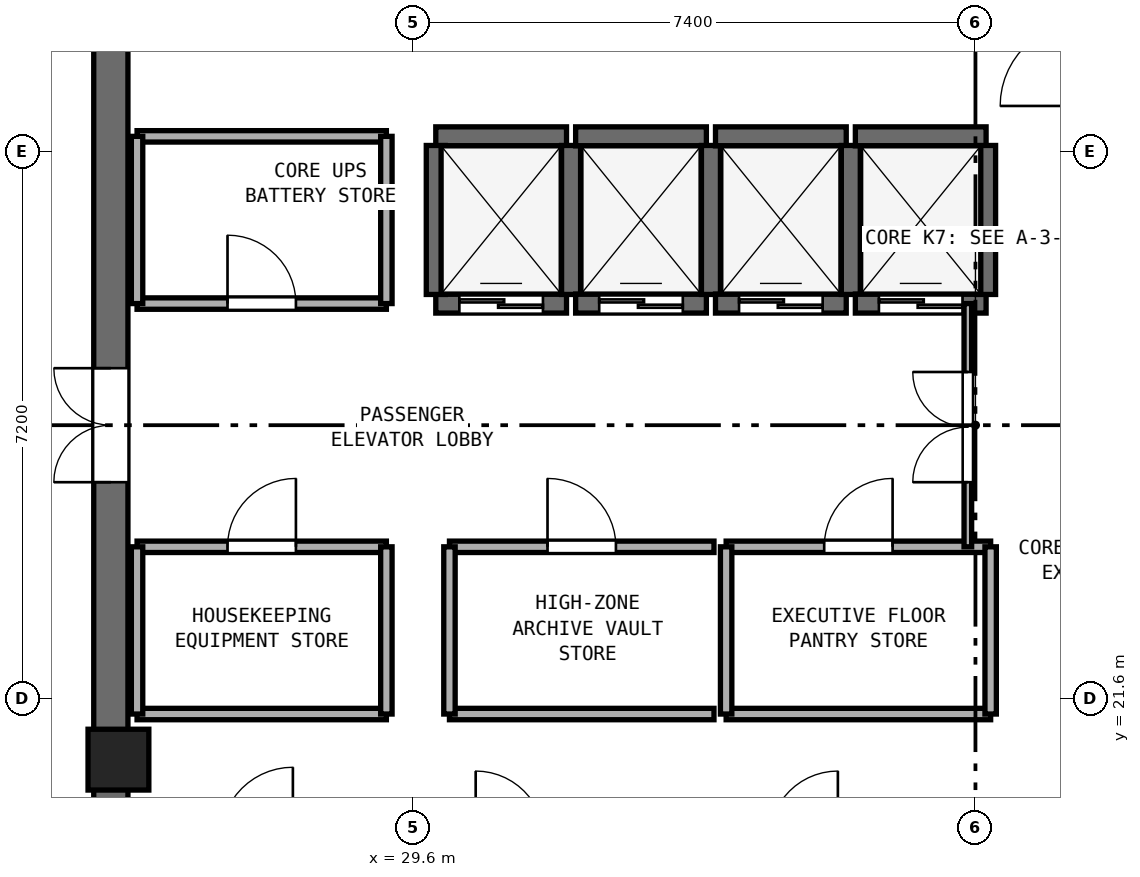
"""IFC4 building model, lengths in metres.
Left out: names, types, materials, properties, quantities, classifications, styles, units other than length and angle.
Written with IfcOpenShell. Run it as: python <this file> out.ifc"""

import sys

from ifc_helpers import new_model, si_unit, direction, frame, frame_2d, origin, origin_2d, place, context, subcontext, project, spatial, rectangle, extrude, element, fill, save


model = new_model("IFC4")
c1 = context("Model", 3, precision=1e-05, world=origin(), true_north=direction((0.0, 1.0)))
c2 = subcontext(c1, "Body", "Model", "MODEL_VIEW")
j1 = project(units=[si_unit("LENGTHUNIT", "METRE"), si_unit("PLANEANGLEUNIT", "RADIAN")], contexts=[c1])
p1 = place(None, origin())
s1 = spatial("IfcSite", under=j1, at=p1, CompositionType="ELEMENT")
p2 = place(p1, origin())
s2 = spatial("IfcBuilding", under=s1, at=p2, CompositionType="ELEMENT")
p3 = place(p2, frame((0.0, 0.0, 240.2)))
s3 = spatial("IfcBuildingStorey", under=s2, at=p3, CompositionType="ELEMENT", Elevation=240.2)
p4 = place(p3, frame((25.625, 17.45, 0.0), z_axis=(0.0, 0.0, 1.0), x_axis=(0.0, 1.0, 0.0)))
e1 = element("IfcWall", 1, at=p4, inside=s3, PredefinedType="SHEAR", context=c2, shape_type="SweptSolid", body=[
    extrude(rectangle(XDim=15.5, YDim=0.45, at=frame_2d((7.75, 0.0))), origin(), (0.0, 0.0, 1.0), 3.51),
])
p5 = place(p4, frame((7.0, 0.0, 0.0)))
e2 = element("IfcOpeningElement", 2, at=p5, cuts=e1, PredefinedType="OPENING", context=c2, shape_type="SweptSolid", body=[
    extrude(rectangle(XDim=1.5, YDim=2.15, at=frame_2d((0.75, 1.075))), frame((0.0, 0.235, 0.0), z_axis=(0.0, -1.0, 0.0), x_axis=(1.0, 0.0, 0.0)), (0.0, 0.0, 1.0), 0.47),
])
p6 = place(p3, frame((25.725, 20.8, 0.0), z_axis=(0.0, 0.0, 1.0), x_axis=(1.0, 0.0, 0.0)))
e3 = element("IfcColumn", 3, at=p6, inside=s3, PredefinedType="PILASTER", context=c2, shape_type="SweptSolid", body=[
    extrude(rectangle(XDim=0.8, YDim=0.8, at=origin_2d()), origin(), (0.0, 0.0, 1.0), 3.8),
])
p7 = place(p3, frame((29.9, 26.8, 0.0), z_axis=(0.0, 0.0, 1.0), x_axis=(1.0, 0.0, 0.0)))
e4 = element("IfcWall", 4, at=p7, inside=s3, PredefinedType="SHEAR", context=c2, shape_type="SweptSolid", body=[
    extrude(rectangle(XDim=1.72, YDim=0.25, at=frame_2d((0.86, 0.0))), origin(), (0.0, 0.0, 1.0), 3.51),
])
p8 = place(p7, frame((0.31, 0.0, 0.0)))
e5 = element("IfcOpeningElement", 5, at=p8, cuts=e4, PredefinedType="OPENING", context=c2, shape_type="SweptSolid", body=[
    extrude(rectangle(XDim=1.1, YDim=2.15, at=frame_2d((0.55, 1.075))), frame((0.0, 0.135, 0.0), z_axis=(0.0, -1.0, 0.0), x_axis=(1.0, 0.0, 0.0)), (0.0, 0.0, 1.0), 0.27),
])
p9 = place(p3, frame((29.9, 29.0, 0.0), z_axis=(0.0, 0.0, 1.0), x_axis=(1.0, 0.0, 0.0)))
e6 = element("IfcWall", 6, at=p9, inside=s3, PredefinedType="SHEAR", context=c2, shape_type="SweptSolid", body=[
    extrude(rectangle(XDim=1.72, YDim=0.25, at=frame_2d((0.86, 0.0))), origin(), (0.0, 0.0, 1.0), 3.51),
])
for number, where, z_axis, x_axis in (
    (7, (29.9, 26.92, 0.0), (0.0, 0.0, 1.0), (0.0, 1.0, 0.0)),
    (8, (31.68, 26.92, 0.0), (0.0, 0.0, 1.0), (0.0, 1.0, 0.0)),
):
    element("IfcWall", number, at=place(p3, frame(where, z_axis=z_axis, x_axis=x_axis)), inside=s3, PredefinedType="SHEAR", context=c2, shape_type="SweptSolid", body=[
        extrude(rectangle(XDim=1.96, YDim=0.25, at=frame_2d((0.98, 0.0))), origin(), (0.0, 0.0, 1.0), 3.51),
    ])
p10 = place(p3, frame((31.74, 26.8, 0.0), z_axis=(0.0, 0.0, 1.0), x_axis=(1.0, 0.0, 0.0)))
e9 = element("IfcWall", 9, at=p10, inside=s3, PredefinedType="SHEAR", context=c2, shape_type="SweptSolid", body=[
    extrude(rectangle(XDim=1.72, YDim=0.25, at=frame_2d((0.86, 0.0))), origin(), (0.0, 0.0, 1.0), 3.51),
])
p11 = place(p10, frame((0.31, 0.0, 0.0)))
e10 = element("IfcOpeningElement", 10, at=p11, cuts=e9, PredefinedType="OPENING", context=c2, shape_type="SweptSolid", body=[
    extrude(rectangle(XDim=1.1, YDim=2.15, at=frame_2d((0.55, 1.075))), frame((0.0, 0.135, 0.0), z_axis=(0.0, -1.0, 0.0), x_axis=(1.0, 0.0, 0.0)), (0.0, 0.0, 1.0), 0.27),
])
p12 = place(p3, frame((31.74, 29.0, 0.0), z_axis=(0.0, 0.0, 1.0), x_axis=(1.0, 0.0, 0.0)))
e11 = element("IfcWall", 11, at=p12, inside=s3, PredefinedType="SHEAR", context=c2, shape_type="SweptSolid", body=[
    extrude(rectangle(XDim=1.72, YDim=0.25, at=frame_2d((0.86, 0.0))), origin(), (0.0, 0.0, 1.0), 3.51),
])
p13 = place(p3, frame((33.52, 26.92, 0.0), z_axis=(0.0, 0.0, 1.0), x_axis=(0.0, 1.0, 0.0)))
e12 = element("IfcWall", 12, at=p13, inside=s3, PredefinedType="SHEAR", context=c2, shape_type="SweptSolid", body=[
    extrude(rectangle(XDim=1.96, YDim=0.25, at=frame_2d((0.98, 0.0))), origin(), (0.0, 0.0, 1.0), 3.51),
])
p14 = place(p3, frame((33.58, 26.8, 0.0), z_axis=(0.0, 0.0, 1.0), x_axis=(1.0, 0.0, 0.0)))
e13 = element("IfcWall", 13, at=p14, inside=s3, PredefinedType="SHEAR", context=c2, shape_type="SweptSolid", body=[
    extrude(rectangle(XDim=1.72, YDim=0.25, at=frame_2d((0.86, 0.0))), origin(), (0.0, 0.0, 1.0), 3.51),
])
p15 = place(p14, frame((0.31, 0.0, 0.0)))
e14 = element("IfcOpeningElement", 14, at=p15, cuts=e13, PredefinedType="OPENING", context=c2, shape_type="SweptSolid", body=[
    extrude(rectangle(XDim=1.1, YDim=2.15, at=frame_2d((0.55, 1.075))), frame((0.0, 0.135, 0.0), z_axis=(0.0, -1.0, 0.0), x_axis=(1.0, 0.0, 0.0)), (0.0, 0.0, 1.0), 0.27),
])
p16 = place(p3, frame((33.58, 29.0, 0.0), z_axis=(0.0, 0.0, 1.0), x_axis=(1.0, 0.0, 0.0)))
e15 = element("IfcWall", 15, at=p16, inside=s3, PredefinedType="SHEAR", context=c2, shape_type="SweptSolid", body=[
    extrude(rectangle(XDim=1.72, YDim=0.25, at=frame_2d((0.86, 0.0))), origin(), (0.0, 0.0, 1.0), 3.51),
])
p17 = place(p3, frame((35.36, 26.92, 0.0), z_axis=(0.0, 0.0, 1.0), x_axis=(0.0, 1.0, 0.0)))
e16 = element("IfcWall", 16, at=p17, inside=s3, PredefinedType="SHEAR", context=c2, shape_type="SweptSolid", body=[
    extrude(rectangle(XDim=1.96, YDim=0.25, at=frame_2d((0.98, 0.0))), origin(), (0.0, 0.0, 1.0), 3.51),
])
p18 = place(p3, frame((35.42, 26.8, 0.0), z_axis=(0.0, 0.0, 1.0), x_axis=(1.0, 0.0, 0.0)))
e17 = element("IfcWall", 17, at=p18, inside=s3, PredefinedType="SHEAR", context=c2, shape_type="SweptSolid", body=[
    extrude(rectangle(XDim=1.72, YDim=0.25, at=frame_2d((0.86, 0.0))), origin(), (0.0, 0.0, 1.0), 3.51),
])
p19 = place(p18, frame((0.31, 0.0, 0.0)))
e18 = element("IfcOpeningElement", 18, at=p19, cuts=e17, PredefinedType="OPENING", context=c2, shape_type="SweptSolid", body=[
    extrude(rectangle(XDim=1.1, YDim=2.15, at=frame_2d((0.55, 1.075))), frame((0.0, 0.135, 0.0), z_axis=(0.0, -1.0, 0.0), x_axis=(1.0, 0.0, 0.0)), (0.0, 0.0, 1.0), 0.27),
])
p20 = place(p3, frame((35.42, 29.0, 0.0), z_axis=(0.0, 0.0, 1.0), x_axis=(1.0, 0.0, 0.0)))
e19 = element("IfcWall", 19, at=p20, inside=s3, PredefinedType="SHEAR", context=c2, shape_type="SweptSolid", body=[
    extrude(rectangle(XDim=1.72, YDim=0.25, at=frame_2d((0.86, 0.0))), origin(), (0.0, 0.0, 1.0), 3.51),
])
p21 = place(p3, frame((37.14, 26.92, 0.0), z_axis=(0.0, 0.0, 1.0), x_axis=(0.0, 1.0, 0.0)))
e20 = element("IfcWall", 20, at=p21, inside=s3, PredefinedType="SHEAR", context=c2, shape_type="SweptSolid", body=[
    extrude(rectangle(XDim=1.96, YDim=0.25, at=frame_2d((0.98, 0.0))), origin(), (0.0, 0.0, 1.0), 3.51),
])
p22 = place(p3, frame((25.97, 26.8, 0.0), z_axis=(0.0, 0.0, 1.0), x_axis=(1.0, 0.0, 0.0)))
e21 = element("IfcWall", 21, at=p22, inside=s3, PredefinedType="PARTITIONING", context=c2, shape_type="SweptSolid", body=[
    extrude(rectangle(XDim=3.28, YDim=0.15, at=frame_2d((1.64, 0.0))), origin(), (0.0, 0.0, 1.0), 3.51),
])
p23 = place(p22, frame((1.19, 0.0, 0.0)))
e22 = element("IfcOpeningElement", 22, at=p23, cuts=e21, PredefinedType="OPENING", context=c2, shape_type="SweptSolid", body=[
    extrude(rectangle(XDim=0.9, YDim=2.1, at=frame_2d((0.45, 1.05))), frame((0.0, 0.085, 0.0), z_axis=(0.0, -1.0, 0.0), x_axis=(1.0, 0.0, 0.0)), (0.0, 0.0, 1.0), 0.17),
])
p24 = place(p3, frame((25.97, 29.0, 0.0), z_axis=(0.0, 0.0, 1.0), x_axis=(1.0, 0.0, 0.0)))
e23 = element("IfcWall", 23, at=p24, inside=s3, PredefinedType="PARTITIONING", context=c2, shape_type="SweptSolid", body=[
    extrude(rectangle(XDim=3.28, YDim=0.15, at=frame_2d((1.64, 0.0))), origin(), (0.0, 0.0, 1.0), 3.51),
])
p25 = place(p3, frame((25.97, 26.8, 0.0), z_axis=(0.0, 0.0, 1.0), x_axis=(0.0, 1.0, 0.0)))
e24 = element("IfcWall", 24, at=p25, inside=s3, PredefinedType="PARTITIONING", context=c2, shape_type="SweptSolid", body=[
    extrude(rectangle(XDim=2.2, YDim=0.15, at=frame_2d((1.1, 0.0))), origin(), (0.0, 0.0, 1.0), 2.61),
])
p26 = place(p3, frame((29.25, 26.8, 0.0), z_axis=(0.0, 0.0, 1.0), x_axis=(0.0, 1.0, 0.0)))
e25 = element("IfcWall", 25, at=p26, inside=s3, PredefinedType="PARTITIONING", context=c2, shape_type="SweptSolid", body=[
    extrude(rectangle(XDim=2.2, YDim=0.15, at=frame_2d((1.1, 0.0))), origin(), (0.0, 0.0, 1.0), 3.51),
])
p27 = place(p3, frame((25.97, 21.4, 0.0), z_axis=(0.0, 0.0, 1.0), x_axis=(1.0, 0.0, 0.0)))
e26 = element("IfcWall", 26, at=p27, inside=s3, PredefinedType="PARTITIONING", context=c2, shape_type="SweptSolid", body=[
    extrude(rectangle(XDim=3.28, YDim=0.15, at=frame_2d((1.64, 0.0))), origin(), (0.0, 0.0, 1.0), 3.51),
])
p28 = place(p3, frame((25.97, 23.6, 0.0), z_axis=(0.0, 0.0, 1.0), x_axis=(1.0, 0.0, 0.0)))
e27 = element("IfcWall", 27, at=p28, inside=s3, PredefinedType="PARTITIONING", context=c2, shape_type="SweptSolid", body=[
    extrude(rectangle(XDim=3.28, YDim=0.15, at=frame_2d((1.64, 0.0))), origin(), (0.0, 0.0, 1.0), 3.51),
])
p29 = place(p28, frame((1.19, 0.0, 0.0)))
e28 = element("IfcOpeningElement", 28, at=p29, cuts=e27, PredefinedType="OPENING", context=c2, shape_type="SweptSolid", body=[
    extrude(rectangle(XDim=0.9, YDim=2.1, at=frame_2d((0.45, 1.05))), frame((0.0, 0.085, 0.0), z_axis=(0.0, -1.0, 0.0), x_axis=(1.0, 0.0, 0.0)), (0.0, 0.0, 1.0), 0.17),
])
p30 = place(p3, frame((25.97, 21.4, 0.0), z_axis=(0.0, 0.0, 1.0), x_axis=(0.0, 1.0, 0.0)))
e29 = element("IfcWall", 29, at=p30, inside=s3, PredefinedType="PARTITIONING", context=c2, shape_type="SweptSolid", body=[
    extrude(rectangle(XDim=2.2, YDim=0.15, at=frame_2d((1.1, 0.0))), origin(), (0.0, 0.0, 1.0), 2.61),
])
p31 = place(p3, frame((29.25, 21.4, 0.0), z_axis=(0.0, 0.0, 1.0), x_axis=(0.0, 1.0, 0.0)))
e30 = element("IfcWall", 30, at=p31, inside=s3, PredefinedType="PARTITIONING", context=c2, shape_type="SweptSolid", body=[
    extrude(rectangle(XDim=2.2, YDim=0.15, at=frame_2d((1.1, 0.0))), origin(), (0.0, 0.0, 1.0), 3.51),
])
p32 = place(p3, frame((30.08, 21.4, 0.0), z_axis=(0.0, 0.0, 1.0), x_axis=(1.0, 0.0, 0.0)))
e31 = element("IfcWall", 31, at=p32, inside=s3, PredefinedType="PARTITIONING", context=c2, shape_type="SweptSolid", body=[
    extrude(rectangle(XDim=3.48, YDim=0.15, at=frame_2d((1.74, 0.0))), origin(), (0.0, 0.0, 1.0), 3.51),
])
p33 = place(p3, frame((30.08, 23.6, 0.0), z_axis=(0.0, 0.0, 1.0), x_axis=(1.0, 0.0, 0.0)))
e32 = element("IfcWall", 32, at=p33, inside=s3, PredefinedType="PARTITIONING", context=c2, shape_type="SweptSolid", body=[
    extrude(rectangle(XDim=3.48, YDim=0.15, at=frame_2d((1.74, 0.0))), origin(), (0.0, 0.0, 1.0), 3.51),
])
p34 = place(p33, frame((1.29, 0.0, 0.0)))
e33 = element("IfcOpeningElement", 33, at=p34, cuts=e32, PredefinedType="OPENING", context=c2, shape_type="SweptSolid", body=[
    extrude(rectangle(XDim=0.9, YDim=2.1, at=frame_2d((0.45, 1.05))), frame((0.0, 0.085, 0.0), z_axis=(0.0, -1.0, 0.0), x_axis=(1.0, 0.0, 0.0)), (0.0, 0.0, 1.0), 0.17),
])
p35 = place(p3, frame((30.08, 21.4, 0.0), z_axis=(0.0, 0.0, 1.0), x_axis=(0.0, 1.0, 0.0)))
e34 = element("IfcWall", 34, at=p35, inside=s3, PredefinedType="PARTITIONING", context=c2, shape_type="SweptSolid", body=[
    extrude(rectangle(XDim=2.2, YDim=0.15, at=frame_2d((1.1, 0.0))), origin(), (0.0, 0.0, 1.0), 3.51),
])
p36 = place(p3, frame((33.72, 21.4, 0.0), z_axis=(0.0, 0.0, 1.0), x_axis=(1.0, 0.0, 0.0)))
e35 = element("IfcWall", 35, at=p36, inside=s3, PredefinedType="PARTITIONING", context=c2, shape_type="SweptSolid", body=[
    extrude(rectangle(XDim=3.48, YDim=0.15, at=frame_2d((1.74, 0.0))), origin(), (0.0, 0.0, 1.0), 3.51),
])
p37 = place(p3, frame((33.72, 23.6, 0.0), z_axis=(0.0, 0.0, 1.0), x_axis=(1.0, 0.0, 0.0)))
e36 = element("IfcWall", 36, at=p37, inside=s3, PredefinedType="PARTITIONING", context=c2, shape_type="SweptSolid", body=[
    extrude(rectangle(XDim=3.48, YDim=0.15, at=frame_2d((1.74, 0.0))), origin(), (0.0, 0.0, 1.0), 3.51),
])
p38 = place(p37, frame((1.29, 0.0, 0.0)))
e37 = element("IfcOpeningElement", 37, at=p38, cuts=e36, PredefinedType="OPENING", context=c2, shape_type="SweptSolid", body=[
    extrude(rectangle(XDim=0.9, YDim=2.1, at=frame_2d((0.45, 1.05))), frame((0.0, 0.085, 0.0), z_axis=(0.0, -1.0, 0.0), x_axis=(1.0, 0.0, 0.0)), (0.0, 0.0, 1.0), 0.17),
])
for number, where, z_axis, x_axis in (
    (38, (33.72, 21.4, 0.0), (0.0, 0.0, 1.0), (0.0, 1.0, 0.0)),
    (39, (37.2, 21.4, 0.0), (0.0, 0.0, 1.0), (0.0, 1.0, 0.0)),
):
    element("IfcWall", number, at=place(p3, frame(where, z_axis=z_axis, x_axis=x_axis)), inside=s3, PredefinedType="PARTITIONING", context=c2, shape_type="SweptSolid", body=[
        extrude(rectangle(XDim=2.2, YDim=0.15, at=frame_2d((1.1, 0.0))), origin(), (0.0, 0.0, 1.0), 3.51),
    ])
p39 = place(p3, frame((36.9, 23.6, 0.0), z_axis=(0.0, 0.0, 1.0), x_axis=(0.0, 1.0, 0.0)))
e40 = element("IfcWall", 40, at=p39, inside=s3, PredefinedType="PARTITIONING", context=c2, shape_type="SweptSolid", body=[
    extrude(rectangle(XDim=3.2, YDim=0.1, at=frame_2d((1.6, 0.0))), origin(), (0.0, 0.0, 1.0), 3.51),
])
p40 = place(p39, frame((0.85, 0.0, 0.0)))
e41 = element("IfcOpeningElement", 41, at=p40, cuts=e40, PredefinedType="OPENING", context=c2, shape_type="SweptSolid", body=[
    extrude(rectangle(XDim=1.45, YDim=2.12, at=frame_2d((0.725, 1.06))), frame((0.0, 0.06, 0.0), z_axis=(0.0, -1.0, 0.0), x_axis=(1.0, 0.0, 0.0)), (0.0, 0.0, 1.0), 0.12),
])
p41 = place(p8, origin())
e42 = element("IfcDoor", 42, at=p41, inside=s3, OperationType="DOUBLE_DOOR_SLIDING", PredefinedType="DOOR", context=c2, shape_type="SweptSolid", body=[
    extrude(rectangle(XDim=1.1, YDim=2.15, at=frame_2d((0.55, 1.075))), frame((0.0, 0.025, 0.0), z_axis=(0.0, -1.0, 0.0), x_axis=(1.0, 0.0, 0.0)), (0.0, 0.0, 1.0), 0.05),
])
fill(e5, e42)
p42 = place(p11, origin())
e43 = element("IfcDoor", 43, at=p42, inside=s3, OperationType="DOUBLE_DOOR_SLIDING", PredefinedType="DOOR", context=c2, shape_type="SweptSolid", body=[
    extrude(rectangle(XDim=1.1, YDim=2.15, at=frame_2d((0.55, 1.075))), frame((0.0, 0.025, 0.0), z_axis=(0.0, -1.0, 0.0), x_axis=(1.0, 0.0, 0.0)), (0.0, 0.0, 1.0), 0.05),
])
fill(e10, e43)
p43 = place(p15, origin())
e44 = element("IfcDoor", 44, at=p43, inside=s3, OperationType="DOUBLE_DOOR_SLIDING", PredefinedType="DOOR", context=c2, shape_type="SweptSolid", body=[
    extrude(rectangle(XDim=1.1, YDim=2.15, at=frame_2d((0.55, 1.075))), frame((0.0, 0.025, 0.0), z_axis=(0.0, -1.0, 0.0), x_axis=(1.0, 0.0, 0.0)), (0.0, 0.0, 1.0), 0.05),
])
fill(e14, e44)
p44 = place(p19, origin())
e45 = element("IfcDoor", 45, at=p44, inside=s3, OperationType="DOUBLE_DOOR_SLIDING", PredefinedType="DOOR", context=c2, shape_type="SweptSolid", body=[
    extrude(rectangle(XDim=1.1, YDim=2.15, at=frame_2d((0.55, 1.075))), frame((0.0, 0.025, 0.0), z_axis=(0.0, -1.0, 0.0), x_axis=(1.0, 0.0, 0.0)), (0.0, 0.0, 1.0), 0.05),
])
fill(e18, e45)
p45 = place(p5, origin())
e46 = element("IfcDoor", 46, at=p45, inside=s3, OperationType="DOUBLE_DOOR_SINGLE_SWING", PredefinedType="DOOR", context=c2, shape_type="SweptSolid", body=[
    extrude(rectangle(XDim=1.5, YDim=2.15, at=frame_2d((0.75, 1.075))), frame((0.0, 0.025, 0.0), z_axis=(0.0, -1.0, 0.0), x_axis=(1.0, 0.0, 0.0)), (0.0, 0.0, 1.0), 0.05),
])
fill(e2, e46)
p46 = place(p23, origin())
e47 = element("IfcDoor", 47, at=p46, inside=s3, OperationType="SINGLE_SWING_LEFT", PredefinedType="DOOR", context=c2, shape_type="SweptSolid", body=[
    extrude(rectangle(XDim=0.9, YDim=2.1, at=frame_2d((0.45, 1.05))), frame((0.0, 0.025, 0.0), z_axis=(0.0, -1.0, 0.0), x_axis=(1.0, 0.0, 0.0)), (0.0, 0.0, 1.0), 0.05),
])
fill(e22, e47)
p47 = place(p29, origin())
e48 = element("IfcDoor", 48, at=p47, inside=s3, OperationType="SINGLE_SWING_RIGHT", PredefinedType="DOOR", context=c2, shape_type="SweptSolid", body=[
    extrude(rectangle(XDim=0.9, YDim=2.1, at=frame_2d((0.45, 1.05))), frame((0.0, 0.025, 0.0), z_axis=(0.0, -1.0, 0.0), x_axis=(1.0, 0.0, 0.0)), (0.0, 0.0, 1.0), 0.05),
])
fill(e28, e48)
p48 = place(p34, origin())
e49 = element("IfcDoor", 49, at=p48, inside=s3, OperationType="SINGLE_SWING_LEFT", PredefinedType="DOOR", context=c2, shape_type="SweptSolid", body=[
    extrude(rectangle(XDim=0.9, YDim=2.1, at=frame_2d((0.45, 1.05))), frame((0.0, 0.025, 0.0), z_axis=(0.0, -1.0, 0.0), x_axis=(1.0, 0.0, 0.0)), (0.0, 0.0, 1.0), 0.05),
])
fill(e33, e49)
p49 = place(p38, origin())
e50 = element("IfcDoor", 50, at=p49, inside=s3, OperationType="SINGLE_SWING_RIGHT", PredefinedType="DOOR", context=c2, shape_type="SweptSolid", body=[
    extrude(rectangle(XDim=0.9, YDim=2.1, at=frame_2d((0.45, 1.05))), frame((0.0, 0.025, 0.0), z_axis=(0.0, -1.0, 0.0), x_axis=(1.0, 0.0, 0.0)), (0.0, 0.0, 1.0), 0.05),
])
fill(e37, e50)
p50 = place(p40, origin())
e51 = element("IfcDoor", 51, at=p50, inside=s3, OperationType="DOUBLE_DOOR_SINGLE_SWING", PredefinedType="DOOR", context=c2, shape_type="SweptSolid", body=[
    extrude(rectangle(XDim=1.45, YDim=2.12, at=frame_2d((0.725, 1.06))), frame((0.0, 0.025, 0.0), z_axis=(0.0, -1.0, 0.0), x_axis=(1.0, 0.0, 0.0)), (0.0, 0.0, 1.0), 0.05),
])
fill(e41, e51)
save(model, sys.argv[1])
